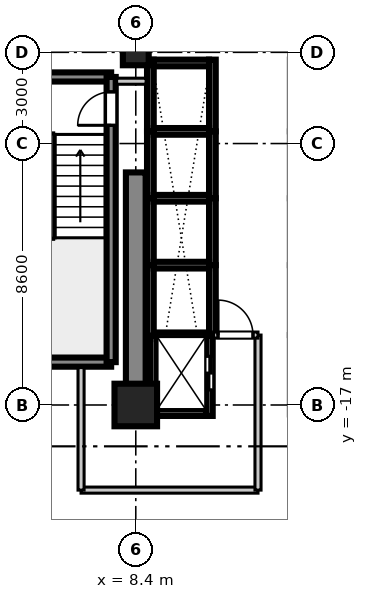
"""IFC4 building model, lengths in metres.
Left out: names, types, materials, properties, quantities, classifications, styles, units other than length and angle.
Written with IfcOpenShell. Run it as: python <this file> out.ifc"""

import sys

from ifc_helpers import new_model, si_unit, direction, frame, frame_2d, origin, origin_2d, place, context, subcontext, project, spatial, rectangle, extrude, source, transform, mapped, element, fill, save


model = new_model("IFC4")
c1 = context("Model", 3, precision=1e-05, world=origin(), true_north=direction((0.0, 1.0)))
c2 = subcontext(c1, "Body", "Model", "MODEL_VIEW")
j1 = project(units=[si_unit("LENGTHUNIT", "METRE"), si_unit("PLANEANGLEUNIT", "RADIAN")], contexts=[c1])
p1 = place(None, origin())
s1 = spatial("IfcSite", under=j1, at=p1, CompositionType="ELEMENT")
p2 = place(p1, origin())
s2 = spatial("IfcBuilding", under=s1, at=p2, CompositionType="ELEMENT")
p3 = place(p2, frame((0.0, 0.0, 61.6)))
s3 = spatial("IfcBuildingStorey", under=s2, at=p3, CompositionType="ELEMENT", Elevation=61.6)
m1 = source(origin(), c2, "Body", "SweptSolid", [
    extrude(rectangle(XDim=1.4, YDim=1.4, at=origin_2d()), origin(), (0.0, 0.0, 1.0), 3.605),
])
p4 = place(p3, frame((8.4, -17.0, 0.0), z_axis=(0.0, 0.0, 1.0), x_axis=(1.0, 0.0, 0.0)))
e1 = element("IfcColumn", 1, at=p4, inside=s3, PredefinedType="COLUMN", context=c2, shape_type="MappedRepresentation", body=[
    mapped(m1, transform((0.0, 0.0, 0.0), scale=1.0)),
])
m2 = source(origin(), c2, "Body", "SweptSolid", [
    extrude(rectangle(XDim=0.85, YDim=0.85, at=origin_2d()), origin(), (0.0, 0.0, 1.0), 3.605),
])
p5 = place(p3, frame((8.4, -5.4, 0.0), z_axis=(0.0, 0.0, 1.0), x_axis=(1.0, 0.0, 0.0)))
e2 = element("IfcColumn", 2, at=p5, inside=s3, PredefinedType="PILASTER", context=c2, shape_type="MappedRepresentation", body=[
    mapped(m2, transform((0.0, 0.0, 0.0), scale=1.0)),
])
m3 = source(origin(), c2, "Body", "SweptSolid", [
    extrude(rectangle(XDim=7.65, YDim=0.65, at=frame_2d((3.825, 0.0))), origin(), (0.0, 0.0, 1.0), 3.37),
])
p6 = place(p3, frame((8.4, -17.0, 0.0), z_axis=(0.0, 0.0, 1.0), x_axis=(0.0, 1.0, 0.0)))
e3 = element("IfcWall", 3, at=p6, inside=s3, PredefinedType="SHEAR", context=c2, shape_type="MappedRepresentation", body=[
    mapped(m3, transform((0.0, 0.0, 0.0), scale=1.0)),
])
m4 = source(origin(), c2, "Body", "SweptSolid", [
    extrude(rectangle(XDim=3.98, YDim=0.3, at=frame_2d((1.99, 0.0))), origin(), (0.0, 0.0, 1.0), 3.37),
])
for number, where, z_axis, x_axis in (
    (4, (3.61, -15.59, 0.0), (0.0, 0.0, 1.0), (1.0, 0.0, 0.0)),
    (5, (3.61, -6.21, 0.0), (0.0, 0.0, 1.0), (1.0, 0.0, 0.0)),
):
    element("IfcWall", number, at=place(p3, frame(where, z_axis=z_axis, x_axis=x_axis)), inside=s3, PredefinedType="SHEAR", context=c2, shape_type="MappedRepresentation", body=[
        mapped(m4, transform((0.0, 0.0, 0.0), scale=1.0)),
    ])
m5 = source(origin(), c2, "Body", "SweptSolid", [
    extrude(rectangle(XDim=9.38, YDim=0.3, at=frame_2d((4.69, 0.0))), origin(), (0.0, 0.0, 1.0), 3.37),
])
p7 = place(p3, frame((7.59, -15.59, 0.0), z_axis=(0.0, 0.0, 1.0), x_axis=(0.0, 1.0, 0.0)))
e6 = element("IfcWall", 6, at=p7, inside=s3, PredefinedType="SHEAR", context=c2, shape_type="MappedRepresentation", body=[
    mapped(m5, transform((0.0, 0.0, 0.0), scale=1.0)),
])
p8 = place(p7, frame((7.79, 0.0, 0.0)))
e7 = element("IfcOpeningElement", 7, at=p8, cuts=e6, PredefinedType="OPENING", context=c2, shape_type="SweptSolid", body=[
    extrude(rectangle(XDim=1.1, YDim=2.15, at=frame_2d((0.55, 1.075))), frame((0.0, 0.16, 0.0), z_axis=(0.0, -1.0, 0.0), x_axis=(1.0, 0.0, 0.0)), (0.0, 0.0, 1.0), 0.32),
])
m6 = source(origin(), c2, "Body", "SweptSolid", [
    extrude(rectangle(XDim=2.36, YDim=0.22, at=frame_2d((1.18, 0.0))), origin(), (0.0, 0.0, 1.0), 3.37),
])
for number, where, z_axis, x_axis in (
    (8, (8.88, -8.0, 0.0), (0.0, 0.0, 1.0), (0.0, 1.0, 0.0)),
    (9, (10.92, -8.0, 0.0), (0.0, 0.0, 1.0), (0.0, 1.0, 0.0)),
):
    element("IfcWall", number, at=place(p3, frame(where, z_axis=z_axis, x_axis=x_axis)), inside=s3, PredefinedType="SHEAR", context=c2, shape_type="MappedRepresentation", body=[
        mapped(m6, transform((0.0, 0.0, 0.0), scale=1.0)),
    ])
m7 = source(origin(), c2, "Body", "SweptSolid", [
    extrude(rectangle(XDim=1.82, YDim=0.22, at=frame_2d((0.91, 0.0))), origin(), (0.0, 0.0, 1.0), 3.37),
])
p9 = place(p3, frame((8.99, -5.75, 0.0), z_axis=(0.0, 0.0, 1.0), x_axis=(1.0, 0.0, 0.0)))
e10 = element("IfcWall", 10, at=p9, inside=s3, PredefinedType="SHEAR", context=c2, shape_type="MappedRepresentation", body=[
    mapped(m7, transform((0.0, 0.0, 0.0), scale=1.0)),
])
m8 = source(origin(), c2, "Body", "SweptSolid", [
    extrude(rectangle(XDim=2.2, YDim=0.22, at=frame_2d((1.1, 0.0))), origin(), (0.0, 0.0, 1.0), 3.37),
])
for number, where, z_axis, x_axis in (
    (11, (8.88, -10.2, 0.0), (0.0, 0.0, 1.0), (0.0, 1.0, 0.0)),
    (12, (10.92, -10.2, 0.0), (0.0, 0.0, 1.0), (0.0, 1.0, 0.0)),
):
    element("IfcWall", number, at=place(p3, frame(where, z_axis=z_axis, x_axis=x_axis)), inside=s3, PredefinedType="SHEAR", context=c2, shape_type="MappedRepresentation", body=[
        mapped(m8, transform((0.0, 0.0, 0.0), scale=1.0)),
    ])
m9 = source(origin(), c2, "Body", "SweptSolid", [
    extrude(rectangle(XDim=1.82, YDim=0.22, at=frame_2d((0.91, 0.0))), origin(), (0.0, 0.0, 1.0), 3.65),
])
p10 = place(p3, frame((8.99, -8.0, 0.0), z_axis=(0.0, 0.0, 1.0), x_axis=(1.0, 0.0, 0.0)))
e13 = element("IfcWall", 13, at=p10, inside=s3, PredefinedType="SHEAR", context=c2, shape_type="MappedRepresentation", body=[
    mapped(m9, transform((0.0, 0.0, 0.0), scale=1.0)),
])
for number, where, z_axis, x_axis in (
    (14, (8.88, -12.4, 0.0), (0.0, 0.0, 1.0), (0.0, 1.0, 0.0)),
    (15, (10.92, -12.4, 0.0), (0.0, 0.0, 1.0), (0.0, 1.0, 0.0)),
):
    element("IfcWall", number, at=place(p3, frame(where, z_axis=z_axis, x_axis=x_axis)), inside=s3, PredefinedType="SHEAR", context=c2, shape_type="MappedRepresentation", body=[
        mapped(m8, transform((0.0, 0.0, 0.0), scale=1.0)),
    ])
p11 = place(p3, frame((8.99, -10.2, 0.0), z_axis=(0.0, 0.0, 1.0), x_axis=(1.0, 0.0, 0.0)))
e16 = element("IfcWall", 16, at=p11, inside=s3, PredefinedType="SHEAR", context=c2, shape_type="MappedRepresentation", body=[
    mapped(m9, transform((0.0, 0.0, 0.0), scale=1.0)),
])
m10 = source(origin(), c2, "Body", "SweptSolid", [
    extrude(rectangle(XDim=2.325, YDim=0.22, at=frame_2d((1.163, 0.0))), origin(), (0.0, 0.0, 1.0), 3.37),
])
for number, where, z_axis, x_axis in (
    (17, (8.88, -14.725, 0.0), (0.0, 0.0, 1.0), (0.0, 1.0, 0.0)),
    (18, (10.92, -14.725, 0.0), (0.0, 0.0, 1.0), (0.0, 1.0, 0.0)),
):
    element("IfcWall", number, at=place(p3, frame(where, z_axis=z_axis, x_axis=x_axis)), inside=s3, PredefinedType="SHEAR", context=c2, shape_type="MappedRepresentation", body=[
        mapped(m10, transform((0.0, 0.0, 0.0), scale=1.0)),
    ])
p12 = place(p3, frame((8.99, -12.4, 0.0), z_axis=(0.0, 0.0, 1.0), x_axis=(1.0, 0.0, 0.0)))
e19 = element("IfcWall", 19, at=p12, inside=s3, PredefinedType="SHEAR", context=c2, shape_type="MappedRepresentation", body=[
    mapped(m9, transform((0.0, 0.0, 0.0), scale=1.0)),
])
m11 = source(origin(), c2, "Body", "SweptSolid", [
    extrude(rectangle(XDim=2.635, YDim=0.22, at=frame_2d((1.317, 0.0))), origin(), (0.0, 0.0, 1.0), 3.37),
])
p13 = place(p3, frame((8.98, -17.36, 0.0), z_axis=(0.0, 0.0, 1.0), x_axis=(0.0, 1.0, 0.0)))
e20 = element("IfcWall", 20, at=p13, inside=s3, PredefinedType="SHEAR", context=c2, shape_type="MappedRepresentation", body=[
    mapped(m11, transform((0.0, 0.0, 0.0), scale=1.0)),
])
p14 = place(p3, frame((10.82, -17.36, 0.0), z_axis=(0.0, 0.0, 1.0), x_axis=(0.0, 1.0, 0.0)))
e21 = element("IfcWall", 21, at=p14, inside=s3, PredefinedType="SHEAR", context=c2, shape_type="MappedRepresentation", body=[
    mapped(m11, transform((0.0, 0.0, 0.0), scale=1.0)),
])
p15 = place(p14, frame((0.86, 0.0, 0.0)))
e22 = element("IfcOpeningElement", 22, at=p15, cuts=e21, PredefinedType="OPENING", context=c2, shape_type="SweptSolid", body=[
    extrude(rectangle(XDim=1.1, YDim=2.2, at=frame_2d((0.55, 1.1))), frame((0.0, 0.12, 0.0), z_axis=(0.0, -1.0, 0.0), x_axis=(1.0, 0.0, 0.0)), (0.0, 0.0, 1.0), 0.24),
])
m12 = source(origin(), c2, "Body", "SweptSolid", [
    extrude(rectangle(XDim=1.62, YDim=0.22, at=frame_2d((0.81, 0.0))), origin(), (0.0, 0.0, 1.0), 3.37),
])
p16 = place(p3, frame((9.09, -17.25, 0.0), z_axis=(0.0, 0.0, 1.0), x_axis=(1.0, 0.0, 0.0)))
e23 = element("IfcWall", 23, at=p16, inside=s3, PredefinedType="SHEAR", context=c2, shape_type="MappedRepresentation", body=[
    mapped(m12, transform((0.0, 0.0, 0.0), scale=1.0)),
])
m13 = source(origin(), c2, "Body", "SweptSolid", [
    extrude(rectangle(XDim=1.62, YDim=0.22, at=frame_2d((0.81, 0.0))), origin(), (0.0, 0.0, 1.0), 3.65),
])
p17 = place(p3, frame((9.09, -14.725, 0.0), z_axis=(0.0, 0.0, 1.0), x_axis=(1.0, 0.0, 0.0)))
e24 = element("IfcWall", 24, at=p17, inside=s3, PredefinedType="SHEAR", context=c2, shape_type="MappedRepresentation", body=[
    mapped(m13, transform((0.0, 0.0, 0.0), scale=1.0)),
])
m14 = source(origin(), c2, "Body", "SweptSolid", [
    extrude(rectangle(XDim=5.82, YDim=0.2, at=frame_2d((2.91, 0.0))), origin(), (0.0, 0.0, 1.0), 2.71),
])
p18 = place(p3, frame((6.6, -19.8, 0.0), z_axis=(0.0, 0.0, 1.0), x_axis=(1.0, 0.0, 0.0)))
e25 = element("IfcWall", 25, at=p18, inside=s3, PredefinedType="PARTITIONING", context=c2, shape_type="MappedRepresentation", body=[
    mapped(m14, transform((0.0, 0.0, 0.0), scale=1.0)),
])
m15 = source(origin(), c2, "Body", "SweptSolid", [
    extrude(rectangle(XDim=4.03, YDim=0.2, at=frame_2d((2.015, 0.0))), origin(), (0.0, 0.0, 1.0), 2.71),
])
p19 = place(p3, frame((6.6, -19.8, 0.0), z_axis=(0.0, 0.0, 1.0), x_axis=(0.0, 1.0, 0.0)))
e26 = element("IfcWall", 26, at=p19, inside=s3, PredefinedType="PARTITIONING", context=c2, shape_type="MappedRepresentation", body=[
    mapped(m15, transform((0.0, 0.0, 0.0), scale=1.0)),
])
m16 = source(origin(), c2, "Body", "SweptSolid", [
    extrude(rectangle(XDim=5.1, YDim=0.2, at=frame_2d((2.55, 0.0))), origin(), (0.0, 0.0, 1.0), 2.71),
])
p20 = place(p3, frame((12.42, -19.8, 0.0), z_axis=(0.0, 0.0, 1.0), x_axis=(0.0, 1.0, 0.0)))
e27 = element("IfcWall", 27, at=p20, inside=s3, PredefinedType="PARTITIONING", context=c2, shape_type="MappedRepresentation", body=[
    mapped(m16, transform((0.0, 0.0, 0.0), scale=1.0)),
])
m17 = source(origin(), c2, "Body", "SweptSolid", [
    extrude(rectangle(XDim=1.46, YDim=0.2, at=frame_2d((0.73, 0.0))), origin(), (0.0, 0.0, 1.0), 2.71),
])
p21 = place(p3, frame((10.96, -14.7, 0.0), z_axis=(0.0, 0.0, 1.0), x_axis=(1.0, 0.0, 0.0)))
e28 = element("IfcWall", 28, at=p21, inside=s3, PredefinedType="PARTITIONING", context=c2, shape_type="MappedRepresentation", body=[
    mapped(m17, transform((0.0, 0.0, 0.0), scale=1.0)),
])
p22 = place(p21, frame((0.145, 0.0, 0.0)))
e29 = element("IfcOpeningElement", 29, at=p22, cuts=e28, PredefinedType="OPENING", context=c2, shape_type="SweptSolid", body=[
    extrude(rectangle(XDim=1.15, YDim=2.15, at=frame_2d((0.575, 1.075))), frame((0.0, 0.11, 0.0), z_axis=(0.0, -1.0, 0.0), x_axis=(1.0, 0.0, 0.0)), (0.0, 0.0, 1.0), 0.22),
])
m18 = source(origin(), c2, "Body", "SweptSolid", [
    extrude(rectangle(XDim=0.97, YDim=0.2, at=frame_2d((0.485, 0.0))), origin(), (0.0, 0.0, 1.0), 2.71),
])
p23 = place(p3, frame((7.77, -6.35, 0.0), z_axis=(0.0, 0.0, 1.0), x_axis=(1.0, 0.0, 0.0)))
e30 = element("IfcWall", 30, at=p23, inside=s3, PredefinedType="PARTITIONING", context=c2, shape_type="MappedRepresentation", body=[
    mapped(m18, transform((0.0, 0.0, 0.0), scale=1.0)),
])
m19 = source(origin(), c2, "Body", "SweptSolid", [
    extrude(rectangle(XDim=1.1, YDim=2.15, at=frame_2d((0.55, 1.075))), frame((0.0, 0.025, 0.0), z_axis=(0.0, -1.0, 0.0), x_axis=(1.0, 0.0, 0.0)), (0.0, 0.0, 1.0), 0.05),
])
p24 = place(p8, origin())
e31 = element("IfcDoor", 31, at=p24, inside=s3, OperationType="SINGLE_SWING_LEFT", PredefinedType="DOOR", context=c2, shape_type="MappedRepresentation", body=[
    mapped(m19, transform((0.0, 0.0, 0.0), scale=1.0)),
])
fill(e7, e31)
m20 = source(origin(), c2, "Body", "SweptSolid", [
    extrude(rectangle(XDim=1.1, YDim=2.2, at=frame_2d((0.55, 1.1))), frame((0.0, 0.025, 0.0), z_axis=(0.0, -1.0, 0.0), x_axis=(1.0, 0.0, 0.0)), (0.0, 0.0, 1.0), 0.05),
])
p25 = place(p15, frame((1.1, 0.0, 0.0), z_axis=(0.0, 0.0, 1.0), x_axis=(-1.0, 0.0, 0.0)))
e32 = element("IfcDoor", 32, at=p25, inside=s3, OperationType="DOUBLE_DOOR_SLIDING", PredefinedType="DOOR", context=c2, shape_type="MappedRepresentation", body=[
    mapped(m20, transform((0.0, 0.0, 0.0), scale=1.0)),
])
fill(e22, e32)
m21 = source(origin(), c2, "Body", "SweptSolid", [
    extrude(rectangle(XDim=1.15, YDim=2.15, at=frame_2d((0.575, 1.075))), frame((0.0, 0.025, 0.0), z_axis=(0.0, -1.0, 0.0), x_axis=(1.0, 0.0, 0.0)), (0.0, 0.0, 1.0), 0.05),
])
p26 = place(p22, origin())
e33 = element("IfcDoor", 33, at=p26, inside=s3, OperationType="SINGLE_SWING_LEFT", PredefinedType="DOOR", context=c2, shape_type="MappedRepresentation", body=[
    mapped(m21, transform((0.0, 0.0, 0.0), scale=1.0)),
])
fill(e29, e33)
save(model, sys.argv[1])
